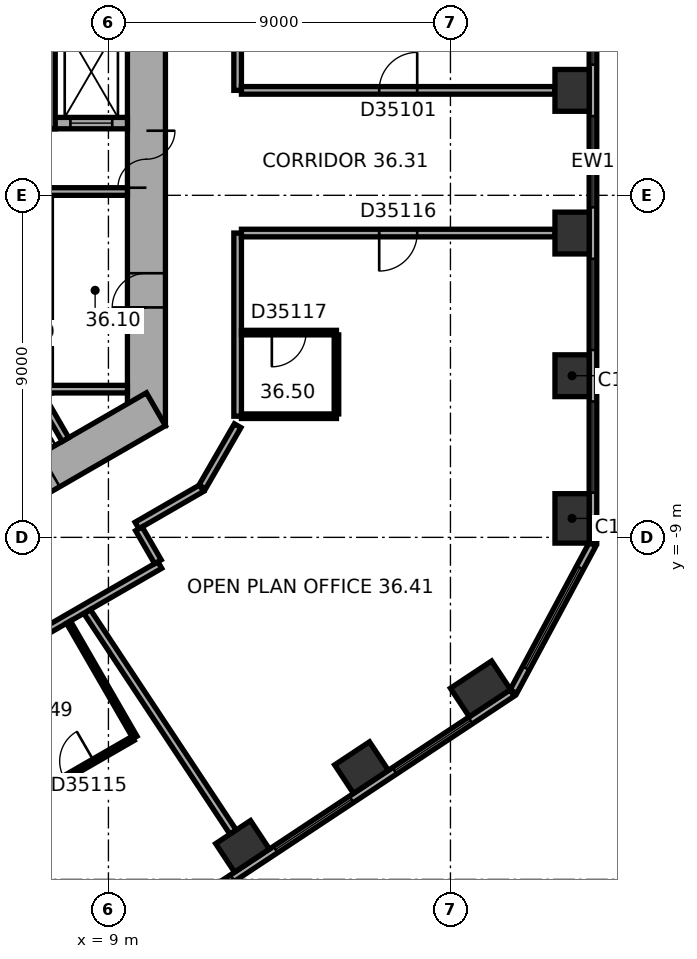
"""IFC4 building model, lengths in metres.
Left out: names, types, materials, properties, quantities, classifications, styles, units other than length and angle.
Written with IfcOpenShell. Run it as: python <this file> out.ifc"""

import sys

from ifc_helpers import new_model, si_unit, direction, frame, frame_2d, origin, origin_2d, place, context, subcontext, project, spatial, rectangle, extrude, element, fill, save


model = new_model("IFC4")
c1 = context("Model", 3, precision=1e-05, world=origin(), true_north=direction((0.0, 1.0)))
c2 = subcontext(c1, "Body", "Model", "MODEL_VIEW")
j1 = project(units=[si_unit("LENGTHUNIT", "METRE"), si_unit("PLANEANGLEUNIT", "RADIAN")], contexts=[c1])
p1 = place(None, origin())
s1 = spatial("IfcSite", under=j1, at=p1, CompositionType="ELEMENT")
p2 = place(p1, origin())
s2 = spatial("IfcBuilding", under=s1, at=p2, CompositionType="ELEMENT")
p3 = place(p2, frame((0.0, 0.0, 150.3)))
s3 = spatial("IfcBuildingStorey", under=s2, at=p3, CompositionType="ELEMENT", Elevation=150.3)
p4 = place(p3, frame((21.2, -8.501, 0.0), z_axis=(0.0, 0.0, 1.0), x_axis=(0.0, 1.0, 0.0)))
e1 = element("IfcColumn", 1, at=p4, inside=s3, PredefinedType="COLUMN", context=c2, shape_type="SweptSolid", body=[
    extrude(rectangle(XDim=1.3, YDim=0.9, at=origin_2d()), origin(), (0.0, 0.0, 1.0), 3.7),
])
for number, where, z_axis, x_axis in (
    (2, (21.2, -4.747, 0.0), (0.0, 0.0, 1.0), (0.0, 1.0, 0.0)),
    (3, (21.2, -0.993, 0.0), (0.0, 0.0, 1.0), (0.0, 1.0, 0.0)),
    (4, (21.2, 2.761, 0.0), (0.0, 0.0, 1.0), (0.0, 1.0, 0.0)),
    (5, (12.529, -17.13, 0.0), (0.0, 0.0, 1.0), (0.834, 0.552, 0.0)),
    (6, (15.659, -15.058, 0.0), (0.0, 0.0, 1.0), (0.834, 0.552, 0.0)),
):
    element("IfcColumn", number, at=place(p3, frame(where, z_axis=z_axis, x_axis=x_axis)), inside=s3, PredefinedType="COLUMN", context=c2, shape_type="SweptSolid", body=[
        extrude(rectangle(XDim=1.1, YDim=0.9, at=origin_2d()), origin(), (0.0, 0.0, 1.0), 3.7),
    ])
p5 = place(p3, frame((18.79, -12.986, 0.0), z_axis=(0.0, 0.0, 1.0), x_axis=(0.833885822067, 0.551936985312, 0.0)))
e7 = element("IfcColumn", 7, at=p5, inside=s3, PredefinedType="COLUMN", context=c2, shape_type="SweptSolid", body=[
    extrude(rectangle(XDim=1.3, YDim=0.9, at=origin_2d()), origin(), (0.0, 0.0, 1.0), 3.7),
])
p6 = place(p3, frame((10.0, -6.062, 0.0), z_axis=(0.0, 0.0, 1.0), x_axis=(0.0, 1.0, 0.0)))
e8 = element("IfcWall", 8, at=p6, inside=s3, PredefinedType="SHEAR", context=c2, shape_type="SweptSolid", body=[
    extrude(rectangle(XDim=12.125, YDim=1.0, at=frame_2d((6.062, 0.0))), origin(), (0.0, 0.0, 1.0), 3.7),
])
p7 = place(p6, frame((6.262, 0.0, 0.0)))
e9 = element("IfcOpeningElement", 9, at=p7, cuts=e8, PredefinedType="OPENING", context=c2, shape_type="SweptSolid", body=[
    extrude(rectangle(XDim=1.5, YDim=2.1, at=frame_2d((0.75, 1.05))), frame((0.0, 0.51, 0.0), z_axis=(0.0, -1.0, 0.0), x_axis=(1.0, 0.0, 0.0)), (0.0, 0.0, 1.0), 1.02),
])
p8 = place(p6, frame((3.112, 0.0, 0.0)))
e10 = element("IfcOpeningElement", 10, at=p8, cuts=e8, PredefinedType="OPENING", context=c2, shape_type="SweptSolid", body=[
    extrude(rectangle(XDim=0.9, YDim=2.1, at=frame_2d((0.45, 1.05))), frame((0.0, 0.51, 0.0), z_axis=(0.0, -1.0, 0.0), x_axis=(1.0, 0.0, 0.0)), (0.0, 0.0, 1.0), 1.02),
])
p9 = place(p3, frame((-0.25, -11.691, 0.0), z_axis=(0.0, 0.0, 1.0), x_axis=(0.866022616891, 0.50000482701, 0.0)))
e11 = element("IfcWall", 11, at=p9, inside=s3, PredefinedType="SHEAR", context=c2, shape_type="SweptSolid", body=[
    extrude(rectangle(XDim=12.125, YDim=1.0, at=frame_2d((6.062, 0.0))), origin(), (0.0, 0.0, 1.0), 3.7),
])
p10 = place(p9, frame((2.612, 0.0, 0.0)))
e12 = element("IfcOpeningElement", 12, at=p10, cuts=e11, PredefinedType="OPENING", context=c2, shape_type="SweptSolid", body=[
    extrude(rectangle(XDim=1.1, YDim=2.1, at=frame_2d((0.55, 1.05))), frame((0.0, 0.51, 0.0), z_axis=(0.0, -1.0, 0.0), x_axis=(1.0, 0.0, 0.0)), (0.0, 0.0, 1.0), 1.02),
])
p11 = place(p9, frame((5.212, 0.0, 0.0)))
e13 = element("IfcOpeningElement", 13, at=p11, cuts=e11, PredefinedType="OPENING", context=c2, shape_type="SweptSolid", body=[
    extrude(rectangle(XDim=1.1, YDim=2.1, at=frame_2d((0.55, 1.05))), frame((0.0, 0.51, 0.0), z_axis=(0.0, -1.0, 0.0), x_axis=(1.0, 0.0, 0.0)), (0.0, 0.0, 1.0), 1.02),
])
p12 = place(p9, frame((7.812, 0.0, 0.0)))
e14 = element("IfcOpeningElement", 14, at=p12, cuts=e11, PredefinedType="OPENING", context=c2, shape_type="SweptSolid", body=[
    extrude(rectangle(XDim=1.1, YDim=2.1, at=frame_2d((0.55, 1.05))), frame((0.0, 0.51, 0.0), z_axis=(0.0, -1.0, 0.0), x_axis=(1.0, 0.0, 0.0)), (0.0, 0.0, 1.0), 1.02),
])
p13 = place(p3, frame((21.75, -9.138, 0.0), z_axis=(0.0, 0.0, 1.0), x_axis=(0.0, 1.0, 0.0)))
e15 = element("IfcWall", 15, at=p13, inside=s3, PredefinedType="STANDARD", context=c2, shape_type="SweptSolid", body=[
    extrude(rectangle(XDim=20.044, YDim=0.2, at=frame_2d((10.022, 0.0))), origin(), (0.0, 0.0, 1.0), 3.7),
])
p14 = place(p13, frame((1.314, 0.0, 0.9)))
e16 = element("IfcOpeningElement", 16, at=p14, cuts=e15, PredefinedType="OPENING", context=c2, shape_type="SweptSolid", body=[
    extrude(rectangle(XDim=2.4, YDim=2.0, at=frame_2d((1.2, 1.0))), frame((0.0, 0.11, 0.0), z_axis=(0.0, -1.0, 0.0), x_axis=(1.0, 0.0, 0.0)), (0.0, 0.0, 1.0), 0.22),
])
p15 = place(p13, frame((5.069, 0.0, 0.9)))
e17 = element("IfcOpeningElement", 17, at=p15, cuts=e15, PredefinedType="OPENING", context=c2, shape_type="SweptSolid", body=[
    extrude(rectangle(XDim=2.4, YDim=2.0, at=frame_2d((1.2, 1.0))), frame((0.0, 0.11, 0.0), z_axis=(0.0, -1.0, 0.0), x_axis=(1.0, 0.0, 0.0)), (0.0, 0.0, 1.0), 0.22),
])
p16 = place(p13, frame((8.823, 0.0, 0.9)))
e18 = element("IfcOpeningElement", 18, at=p16, cuts=e15, PredefinedType="OPENING", context=c2, shape_type="SweptSolid", body=[
    extrude(rectangle(XDim=2.4, YDim=2.0, at=frame_2d((1.2, 1.0))), frame((0.0, 0.11, 0.0), z_axis=(0.0, -1.0, 0.0), x_axis=(1.0, 0.0, 0.0)), (0.0, 0.0, 1.0), 0.22),
])
p17 = place(p13, frame((12.577, 0.0, 0.9)))
e19 = element("IfcOpeningElement", 19, at=p17, cuts=e15, PredefinedType="OPENING", context=c2, shape_type="SweptSolid", body=[
    extrude(rectangle(XDim=2.4, YDim=2.0, at=frame_2d((1.2, 1.0))), frame((0.0, 0.11, 0.0), z_axis=(0.0, -1.0, 0.0), x_axis=(1.0, 0.0, 0.0)), (0.0, 0.0, 1.0), 0.22),
])
p18 = place(p13, frame((16.331, 0.0, 0.9)))
e20 = element("IfcOpeningElement", 20, at=p18, cuts=e15, PredefinedType="OPENING", context=c2, shape_type="SweptSolid", body=[
    extrude(rectangle(XDim=2.4, YDim=2.0, at=frame_2d((1.2, 1.0))), frame((0.0, 0.11, 0.0), z_axis=(0.0, -1.0, 0.0), x_axis=(1.0, 0.0, 0.0)), (0.0, 0.0, 1.0), 0.22),
])
p19 = place(p3, frame((2.911, -24.156, 0.0), z_axis=(0.0, 0.0, 1.0), x_axis=(0.833882163564, 0.551942512668, 0.0)))
e21 = element("IfcWall", 21, at=p19, inside=s3, PredefinedType="STANDARD", context=c2, shape_type="SweptSolid", body=[
    extrude(rectangle(XDim=20.044, YDim=0.2, at=frame_2d((10.022, 0.0))), origin(), (0.0, 0.0, 1.0), 3.7),
])
p20 = place(p19, frame((1.313, 0.0, 0.9)))
e22 = element("IfcOpeningElement", 22, at=p20, cuts=e21, PredefinedType="OPENING", context=c2, shape_type="SweptSolid", body=[
    extrude(rectangle(XDim=2.4, YDim=2.0, at=frame_2d((1.2, 1.0))), frame((0.0, 0.11, 0.0), z_axis=(0.0, -1.0, 0.0), x_axis=(1.0, 0.0, 0.0)), (0.0, 0.0, 1.0), 0.22),
])
p21 = place(p19, frame((5.067, 0.0, 0.9)))
e23 = element("IfcOpeningElement", 23, at=p21, cuts=e21, PredefinedType="OPENING", context=c2, shape_type="SweptSolid", body=[
    extrude(rectangle(XDim=2.4, YDim=2.0, at=frame_2d((1.2, 1.0))), frame((0.0, 0.11, 0.0), z_axis=(0.0, -1.0, 0.0), x_axis=(1.0, 0.0, 0.0)), (0.0, 0.0, 1.0), 0.22),
])
p22 = place(p19, frame((8.821, 0.0, 0.9)))
e24 = element("IfcOpeningElement", 24, at=p22, cuts=e21, PredefinedType="OPENING", context=c2, shape_type="SweptSolid", body=[
    extrude(rectangle(XDim=2.4, YDim=2.0, at=frame_2d((1.2, 1.0))), frame((0.0, 0.11, 0.0), z_axis=(0.0, -1.0, 0.0), x_axis=(1.0, 0.0, 0.0)), (0.0, 0.0, 1.0), 0.22),
])
p23 = place(p19, frame((12.575, 0.0, 0.9)))
e25 = element("IfcOpeningElement", 25, at=p23, cuts=e21, PredefinedType="OPENING", context=c2, shape_type="SweptSolid", body=[
    extrude(rectangle(XDim=2.4, YDim=2.0, at=frame_2d((1.2, 1.0))), frame((0.0, 0.11, 0.0), z_axis=(0.0, -1.0, 0.0), x_axis=(1.0, 0.0, 0.0)), (0.0, 0.0, 1.0), 0.22),
])
p24 = place(p19, frame((16.329, 0.0, 0.9)))
e26 = element("IfcOpeningElement", 26, at=p24, cuts=e21, PredefinedType="OPENING", context=c2, shape_type="SweptSolid", body=[
    extrude(rectangle(XDim=2.4, YDim=2.0, at=frame_2d((1.2, 1.0))), frame((0.0, 0.11, 0.0), z_axis=(0.0, -1.0, 0.0), x_axis=(1.0, 0.0, 0.0)), (0.0, 0.0, 1.0), 0.22),
])
p25 = place(p3, frame((19.658, -13.057, 0.0), z_axis=(0.0, 0.0, 1.0), x_axis=(0.473307879841, 0.880897071672, 0.0)))
e27 = element("IfcWall", 27, at=p25, inside=s3, PredefinedType="STANDARD", context=c2, shape_type="SweptSolid", body=[
    extrude(rectangle(XDim=4.395, YDim=0.2, at=frame_2d((2.197, 0.0))), origin(), (0.0, 0.0, 1.0), 3.7),
])
p26 = place(p25, frame((0.698, 0.0, 0.9)))
e28 = element("IfcOpeningElement", 28, at=p26, cuts=e27, PredefinedType="OPENING", context=c2, shape_type="SweptSolid", body=[
    extrude(rectangle(XDim=3.0, YDim=2.0, at=frame_2d((1.5, 1.0))), frame((0.0, 0.11, 0.0), z_axis=(0.0, -1.0, 0.0), x_axis=(1.0, 0.0, 0.0)), (0.0, 0.0, 1.0), 0.22),
])
for number, where, z_axis, x_axis in (
    (29, (7.3, -5.1, 0.0), (0.0, 0.0, 1.0), (1.0, 0.0, 0.0)),
    (30, (7.3, 0.1, 0.0), (0.0, 0.0, 1.0), (1.0, 0.0, 0.0)),
    (31, (6.768, -4.522, 0.0), (0.0, 0.0, 1.0), (0.5, -0.866, 0.0)),
):
    element("IfcWall", number, at=place(p3, frame(where, z_axis=z_axis, x_axis=x_axis)), inside=s3, PredefinedType="PARTITIONING", context=c2, shape_type="SweptSolid", body=[
        extrude(rectangle(XDim=2.2, YDim=0.2, at=frame_2d((1.1, 0.0))), origin(), (0.0, 0.0, 1.0), 3.42),
    ])
p27 = place(p3, frame((7.3, 1.9, 0.0), z_axis=(0.0, 0.0, 1.0), x_axis=(1.0, 0.0, 0.0)))
e32 = element("IfcWall", 32, at=p27, inside=s3, PredefinedType="SHEAR", context=c2, shape_type="SweptSolid", body=[
    extrude(rectangle(XDim=2.2, YDim=0.3, at=frame_2d((1.1, 0.0))), origin(), (0.0, 0.0, 1.0), 3.42),
])
p28 = place(p27, frame((0.7, 0.0, 0.0)))
e33 = element("IfcOpeningElement", 33, at=p28, cuts=e32, PredefinedType="OPENING", context=c2, shape_type="SweptSolid", body=[
    extrude(rectangle(XDim=1.1, YDim=2.1, at=frame_2d((0.55, 1.05))), frame((0.0, 0.16, 0.0), z_axis=(0.0, -1.0, 0.0), x_axis=(1.0, 0.0, 0.0)), (0.0, 0.0, 1.0), 0.32),
])
p29 = place(p3, frame((7.45, 1.75, 0.0), z_axis=(0.0, 0.0, 1.0), x_axis=(0.0, 1.0, 0.0)))
e34 = element("IfcWall", 34, at=p29, inside=s3, PredefinedType="SHEAR", context=c2, shape_type="SweptSolid", body=[
    extrude(rectangle(XDim=3.35, YDim=0.3, at=frame_2d((1.675, 0.0))), origin(), (0.0, 0.0, 1.0), 3.42),
])
p30 = place(p3, frame((4.955, -12.844, 0.0), z_axis=(0.0, 0.0, 1.0), x_axis=(0.86602379309, 0.500002789795, 0.0)))
e35 = element("IfcWall", 35, at=p30, inside=s3, PredefinedType="PARTITIONING", context=c2, shape_type="SweptSolid", body=[
    extrude(rectangle(XDim=6.232, YDim=0.2, at=frame_2d((3.116, 0.0))), origin(), (0.0, 0.0, 1.0), 3.42),
])
p31 = place(p3, frame((7.949, -11.231, 0.0), z_axis=(0.0, 0.0, 1.0), x_axis=(0.500010275428, -0.866019471182, 0.0)))
e36 = element("IfcWall", 36, at=p31, inside=s3, PredefinedType="PARTITIONING", context=c2, shape_type="SweptSolid", body=[
    extrude(rectangle(XDim=3.5, YDim=0.12, at=frame_2d((1.75, 0.0))), origin(), (0.0, 0.0, 1.0), 3.42),
])
p32 = place(p3, frame((9.647, -14.292, 0.0), z_axis=(0.0, 0.0, 1.0), x_axis=(-0.866040564224, -0.499973740429, 0.0)))
e37 = element("IfcWall", 37, at=p32, inside=s3, PredefinedType="PARTITIONING", context=c2, shape_type="SweptSolid", body=[
    extrude(rectangle(XDim=3.28, YDim=0.12, at=frame_2d((1.64, 0.0))), origin(), (0.0, 0.0, 1.0), 3.42),
])
p33 = place(p32, frame((1.19, 0.0, 0.0)))
e38 = element("IfcOpeningElement", 38, at=p33, cuts=e37, PredefinedType="OPENING", context=c2, shape_type="SweptSolid", body=[
    extrude(rectangle(XDim=0.9, YDim=2.1, at=frame_2d((0.45, 1.05))), frame((0.0, 0.07, 0.0), z_axis=(0.0, -1.0, 0.0), x_axis=(1.0, 0.0, 0.0)), (0.0, 0.0, 1.0), 0.14),
])
p34 = place(p3, frame((9.752, -8.688, 0.0), z_axis=(0.0, 0.0, 1.0), x_axis=(0.865974105138, 0.500088841337, 0.0)))
e39 = element("IfcWall", 39, at=p34, inside=s3, PredefinedType="PARTITIONING", context=c2, shape_type="SweptSolid", body=[
    extrude(rectangle(XDim=1.961, YDim=0.2, at=frame_2d((0.98, 0.0))), origin(), (0.0, 0.0, 1.0), 3.42),
])
p35 = place(p3, frame((10.302, -9.642, 0.0), z_axis=(0.0, 0.0, 1.0), x_axis=(-0.500074377092, 0.865982457891, 0.0)))
e40 = element("IfcWall", 40, at=p35, inside=s3, PredefinedType="PARTITIONING", context=c2, shape_type="SweptSolid", body=[
    extrude(rectangle(XDim=1.001, YDim=0.2, at=frame_2d((0.5, 0.0))), origin(), (0.0, 0.0, 1.0), 3.42),
])
p36 = place(p3, frame((11.47, -7.673, 0.0), z_axis=(0.0, 0.0, 1.0), x_axis=(0.499964847546, 0.866045698112, 0.0)))
e41 = element("IfcWall", 41, at=p36, inside=s3, PredefinedType="PARTITIONING", context=c2, shape_type="SweptSolid", body=[
    extrude(rectangle(XDim=1.86, YDim=0.2, at=frame_2d((0.93, 0.0))), origin(), (0.0, 0.0, 1.0), 3.42),
])
p37 = place(p3, frame((12.281, -16.755, 0.0), z_axis=(0.0, 0.0, 1.0), x_axis=(-0.551925794663, 0.833893228888, 0.0)))
e42 = element("IfcWall", 42, at=p37, inside=s3, PredefinedType="PARTITIONING", context=c2, shape_type="SweptSolid", body=[
    extrude(rectangle(XDim=6.953, YDim=0.2, at=frame_2d((3.476, 0.0))), origin(), (0.0, 0.0, 1.0), 3.42),
])
p38 = place(p3, frame((12.4, -5.812, 0.0), z_axis=(0.0, 0.0, 1.0), x_axis=(0.0, 1.0, 0.0)))
e43 = element("IfcWall", 43, at=p38, inside=s3, PredefinedType="PARTITIONING", context=c2, shape_type="SweptSolid", body=[
    extrude(rectangle(XDim=4.819, YDim=0.2, at=frame_2d((2.41, 0.0))), origin(), (0.0, 0.0, 1.0), 3.42),
])
p39 = place(p3, frame((12.4, 2.761, 0.0), z_axis=(0.0, 0.0, 1.0), x_axis=(0.0, 1.0, 0.0)))
e44 = element("IfcWall", 44, at=p39, inside=s3, PredefinedType="PARTITIONING", context=c2, shape_type="SweptSolid", body=[
    extrude(rectangle(XDim=3.301, YDim=0.2, at=frame_2d((1.65, 0.0))), origin(), (0.0, 0.0, 1.0), 3.42),
])
p40 = place(p3, frame((12.5, -3.612, 0.0), z_axis=(0.0, 0.0, 1.0), x_axis=(1.0, 0.0, 0.0)))
e45 = element("IfcWall", 45, at=p40, inside=s3, PredefinedType="PARTITIONING", context=c2, shape_type="SweptSolid", body=[
    extrude(rectangle(XDim=2.5, YDim=0.12, at=frame_2d((1.25, 0.0))), origin(), (0.0, 0.0, 1.0), 3.42),
])
p41 = place(p40, frame((0.8, 0.0, 0.0)))
e46 = element("IfcOpeningElement", 46, at=p41, cuts=e45, PredefinedType="OPENING", context=c2, shape_type="SweptSolid", body=[
    extrude(rectangle(XDim=0.9, YDim=2.1, at=frame_2d((0.45, 1.05))), frame((0.0, 0.07, 0.0), z_axis=(0.0, -1.0, 0.0), x_axis=(1.0, 0.0, 0.0)), (0.0, 0.0, 1.0), 0.14),
])
p42 = place(p3, frame((12.5, -0.993, 0.0), z_axis=(0.0, 0.0, 1.0), x_axis=(1.0, 0.0, 0.0)))
e47 = element("IfcWall", 47, at=p42, inside=s3, PredefinedType="PARTITIONING", context=c2, shape_type="SweptSolid", body=[
    extrude(rectangle(XDim=8.25, YDim=0.2, at=frame_2d((4.125, 0.0))), origin(), (0.0, 0.0, 1.0), 2.87),
])
p43 = place(p42, frame((3.625, 0.0, 0.0)))
e48 = element("IfcOpeningElement", 48, at=p43, cuts=e47, PredefinedType="OPENING", context=c2, shape_type="SweptSolid", body=[
    extrude(rectangle(XDim=1.0, YDim=2.1, at=frame_2d((0.5, 1.05))), frame((0.0, 0.11, 0.0), z_axis=(0.0, -1.0, 0.0), x_axis=(1.0, 0.0, 0.0)), (0.0, 0.0, 1.0), 0.22),
])
p44 = place(p3, frame((15.0, -5.812, 0.0), z_axis=(0.0, 0.0, 1.0), x_axis=(-1.0, 0.0, 0.0)))
e49 = element("IfcWall", 49, at=p44, inside=s3, PredefinedType="PARTITIONING", context=c2, shape_type="SweptSolid", body=[
    extrude(rectangle(XDim=2.5, YDim=0.12, at=frame_2d((1.25, 0.0))), origin(), (0.0, 0.0, 1.0), 3.42),
])
p45 = place(p3, frame((15.0, -3.672, 0.0), z_axis=(0.0, 0.0, 1.0), x_axis=(0.0, -1.0, 0.0)))
e50 = element("IfcWall", 50, at=p45, inside=s3, PredefinedType="PARTITIONING", context=c2, shape_type="SweptSolid", body=[
    extrude(rectangle(XDim=2.08, YDim=0.12, at=frame_2d((1.04, 0.0))), origin(), (0.0, 0.0, 1.0), 3.42),
])
p46 = place(p3, frame((20.75, 2.761, 0.0), z_axis=(0.0, 0.0, 1.0), x_axis=(-1.0, 0.0, 0.0)))
e51 = element("IfcWall", 51, at=p46, inside=s3, PredefinedType="PARTITIONING", context=c2, shape_type="SweptSolid", body=[
    extrude(rectangle(XDim=8.25, YDim=0.2, at=frame_2d((4.125, 0.0))), origin(), (0.0, 0.0, 1.0), 3.42),
])
p47 = place(p46, frame((3.625, 0.0, 0.0)))
e52 = element("IfcOpeningElement", 52, at=p47, cuts=e51, PredefinedType="OPENING", context=c2, shape_type="SweptSolid", body=[
    extrude(rectangle(XDim=1.0, YDim=2.1, at=frame_2d((0.5, 1.05))), frame((0.0, 0.11, 0.0), z_axis=(0.0, -1.0, 0.0), x_axis=(1.0, 0.0, 0.0)), (0.0, 0.0, 1.0), 0.22),
])
p48 = place(p14, origin())
e53 = element("IfcWindow", 53, at=p48, inside=s3, PartitioningType="SINGLE_PANEL", PredefinedType="WINDOW", context=c2, shape_type="SweptSolid", body=[
    extrude(rectangle(XDim=2.4, YDim=2.0, at=frame_2d((1.2, 1.0))), frame((0.0, 0.03, 0.0), z_axis=(0.0, -1.0, 0.0), x_axis=(1.0, 0.0, 0.0)), (0.0, 0.0, 1.0), 0.06),
])
fill(e16, e53)
p49 = place(p15, origin())
e54 = element("IfcWindow", 54, at=p49, inside=s3, PartitioningType="SINGLE_PANEL", PredefinedType="WINDOW", context=c2, shape_type="SweptSolid", body=[
    extrude(rectangle(XDim=2.4, YDim=2.0, at=frame_2d((1.2, 1.0))), frame((0.0, 0.03, 0.0), z_axis=(0.0, -1.0, 0.0), x_axis=(1.0, 0.0, 0.0)), (0.0, 0.0, 1.0), 0.06),
])
fill(e17, e54)
p50 = place(p16, origin())
e55 = element("IfcWindow", 55, at=p50, inside=s3, PartitioningType="SINGLE_PANEL", PredefinedType="WINDOW", context=c2, shape_type="SweptSolid", body=[
    extrude(rectangle(XDim=2.4, YDim=2.0, at=frame_2d((1.2, 1.0))), frame((0.0, 0.03, 0.0), z_axis=(0.0, -1.0, 0.0), x_axis=(1.0, 0.0, 0.0)), (0.0, 0.0, 1.0), 0.06),
])
fill(e18, e55)
p51 = place(p17, origin())
e56 = element("IfcWindow", 56, at=p51, inside=s3, PartitioningType="SINGLE_PANEL", PredefinedType="WINDOW", context=c2, shape_type="SweptSolid", body=[
    extrude(rectangle(XDim=2.4, YDim=2.0, at=frame_2d((1.2, 1.0))), frame((0.0, 0.03, 0.0), z_axis=(0.0, -1.0, 0.0), x_axis=(1.0, 0.0, 0.0)), (0.0, 0.0, 1.0), 0.06),
])
fill(e19, e56)
p52 = place(p22, origin())
e57 = element("IfcWindow", 57, at=p52, inside=s3, PartitioningType="SINGLE_PANEL", PredefinedType="WINDOW", context=c2, shape_type="SweptSolid", body=[
    extrude(rectangle(XDim=2.4, YDim=2.0, at=frame_2d((1.2, 1.0))), frame((0.0, 0.03, 0.0), z_axis=(0.0, -1.0, 0.0), x_axis=(1.0, 0.0, 0.0)), (0.0, 0.0, 1.0), 0.06),
])
fill(e24, e57)
p53 = place(p23, origin())
e58 = element("IfcWindow", 58, at=p53, inside=s3, PartitioningType="SINGLE_PANEL", PredefinedType="WINDOW", context=c2, shape_type="SweptSolid", body=[
    extrude(rectangle(XDim=2.4, YDim=2.0, at=frame_2d((1.2, 1.0))), frame((0.0, 0.03, 0.0), z_axis=(0.0, -1.0, 0.0), x_axis=(1.0, 0.0, 0.0)), (0.0, 0.0, 1.0), 0.06),
])
fill(e25, e58)
p54 = place(p24, origin())
e59 = element("IfcWindow", 59, at=p54, inside=s3, PartitioningType="SINGLE_PANEL", PredefinedType="WINDOW", context=c2, shape_type="SweptSolid", body=[
    extrude(rectangle(XDim=2.4, YDim=2.0, at=frame_2d((1.2, 1.0))), frame((0.0, 0.03, 0.0), z_axis=(0.0, -1.0, 0.0), x_axis=(1.0, 0.0, 0.0)), (0.0, 0.0, 1.0), 0.06),
])
fill(e26, e59)
p55 = place(p26, origin())
e60 = element("IfcWindow", 60, at=p55, inside=s3, PartitioningType="SINGLE_PANEL", PredefinedType="WINDOW", context=c2, shape_type="SweptSolid", body=[
    extrude(rectangle(XDim=3.0, YDim=2.0, at=frame_2d((1.5, 1.0))), frame((0.0, 0.03, 0.0), z_axis=(0.0, -1.0, 0.0), x_axis=(1.0, 0.0, 0.0)), (0.0, 0.0, 1.0), 0.06),
])
fill(e28, e60)
p56 = place(p7, origin())
e61 = element("IfcDoor", 61, at=p56, inside=s3, OperationType="DOUBLE_DOOR_SINGLE_SWING", PredefinedType="DOOR", context=c2, shape_type="SweptSolid", body=[
    extrude(rectangle(XDim=1.5, YDim=2.1, at=frame_2d((0.75, 1.05))), frame((0.0, 0.025, 0.0), z_axis=(0.0, -1.0, 0.0), x_axis=(1.0, 0.0, 0.0)), (0.0, 0.0, 1.0), 0.05),
])
fill(e9, e61)
p57 = place(p8, origin())
e62 = element("IfcDoor", 62, at=p57, inside=s3, OperationType="SINGLE_SWING_LEFT", PredefinedType="DOOR", context=c2, shape_type="SweptSolid", body=[
    extrude(rectangle(XDim=0.9, YDim=2.1, at=frame_2d((0.45, 1.05))), frame((0.0, 0.025, 0.0), z_axis=(0.0, -1.0, 0.0), x_axis=(1.0, 0.0, 0.0)), (0.0, 0.0, 1.0), 0.05),
])
fill(e10, e62)
p58 = place(p28, origin())
e63 = element("IfcDoor", 63, at=p58, inside=s3, OperationType="DOUBLE_DOOR_SLIDING", PredefinedType="DOOR", context=c2, shape_type="SweptSolid", body=[
    extrude(rectangle(XDim=1.1, YDim=2.1, at=frame_2d((0.55, 1.05))), frame((0.0, 0.025, 0.0), z_axis=(0.0, -1.0, 0.0), x_axis=(1.0, 0.0, 0.0)), (0.0, 0.0, 1.0), 0.05),
])
fill(e33, e63)
p59 = place(p47, origin())
e64 = element("IfcDoor", 64, at=p59, inside=s3, OperationType="SINGLE_SWING_LEFT", PredefinedType="DOOR", context=c2, shape_type="SweptSolid", body=[
    extrude(rectangle(XDim=1.0, YDim=2.1, at=frame_2d((0.5, 1.05))), frame((0.0, 0.025, 0.0), z_axis=(0.0, -1.0, 0.0), x_axis=(1.0, 0.0, 0.0)), (0.0, 0.0, 1.0), 0.05),
])
fill(e52, e64)
p60 = place(p33, origin())
e65 = element("IfcDoor", 65, at=p60, inside=s3, OperationType="SINGLE_SWING_LEFT", PredefinedType="DOOR", context=c2, shape_type="SweptSolid", body=[
    extrude(rectangle(XDim=0.9, YDim=2.1, at=frame_2d((0.45, 1.05))), frame((0.0, 0.025, 0.0), z_axis=(0.0, -1.0, 0.0), x_axis=(1.0, 0.0, 0.0)), (0.0, 0.0, 1.0), 0.05),
])
fill(e38, e65)
p61 = place(p43, origin())
e66 = element("IfcDoor", 66, at=p61, inside=s3, OperationType="SINGLE_SWING_LEFT", PredefinedType="DOOR", context=c2, shape_type="SweptSolid", body=[
    extrude(rectangle(XDim=1.0, YDim=2.1, at=frame_2d((0.5, 1.05))), frame((0.0, 0.025, 0.0), z_axis=(0.0, -1.0, 0.0), x_axis=(1.0, 0.0, 0.0)), (0.0, 0.0, 1.0), 0.05),
])
fill(e48, e66)
p62 = place(p41, origin())
e67 = element("IfcDoor", 67, at=p62, inside=s3, OperationType="SINGLE_SWING_LEFT", PredefinedType="DOOR", context=c2, shape_type="SweptSolid", body=[
    extrude(rectangle(XDim=0.9, YDim=2.1, at=frame_2d((0.45, 1.05))), frame((0.0, 0.025, 0.0), z_axis=(0.0, -1.0, 0.0), x_axis=(1.0, 0.0, 0.0)), (0.0, 0.0, 1.0), 0.05),
])
fill(e46, e67)
save(model, sys.argv[1])
